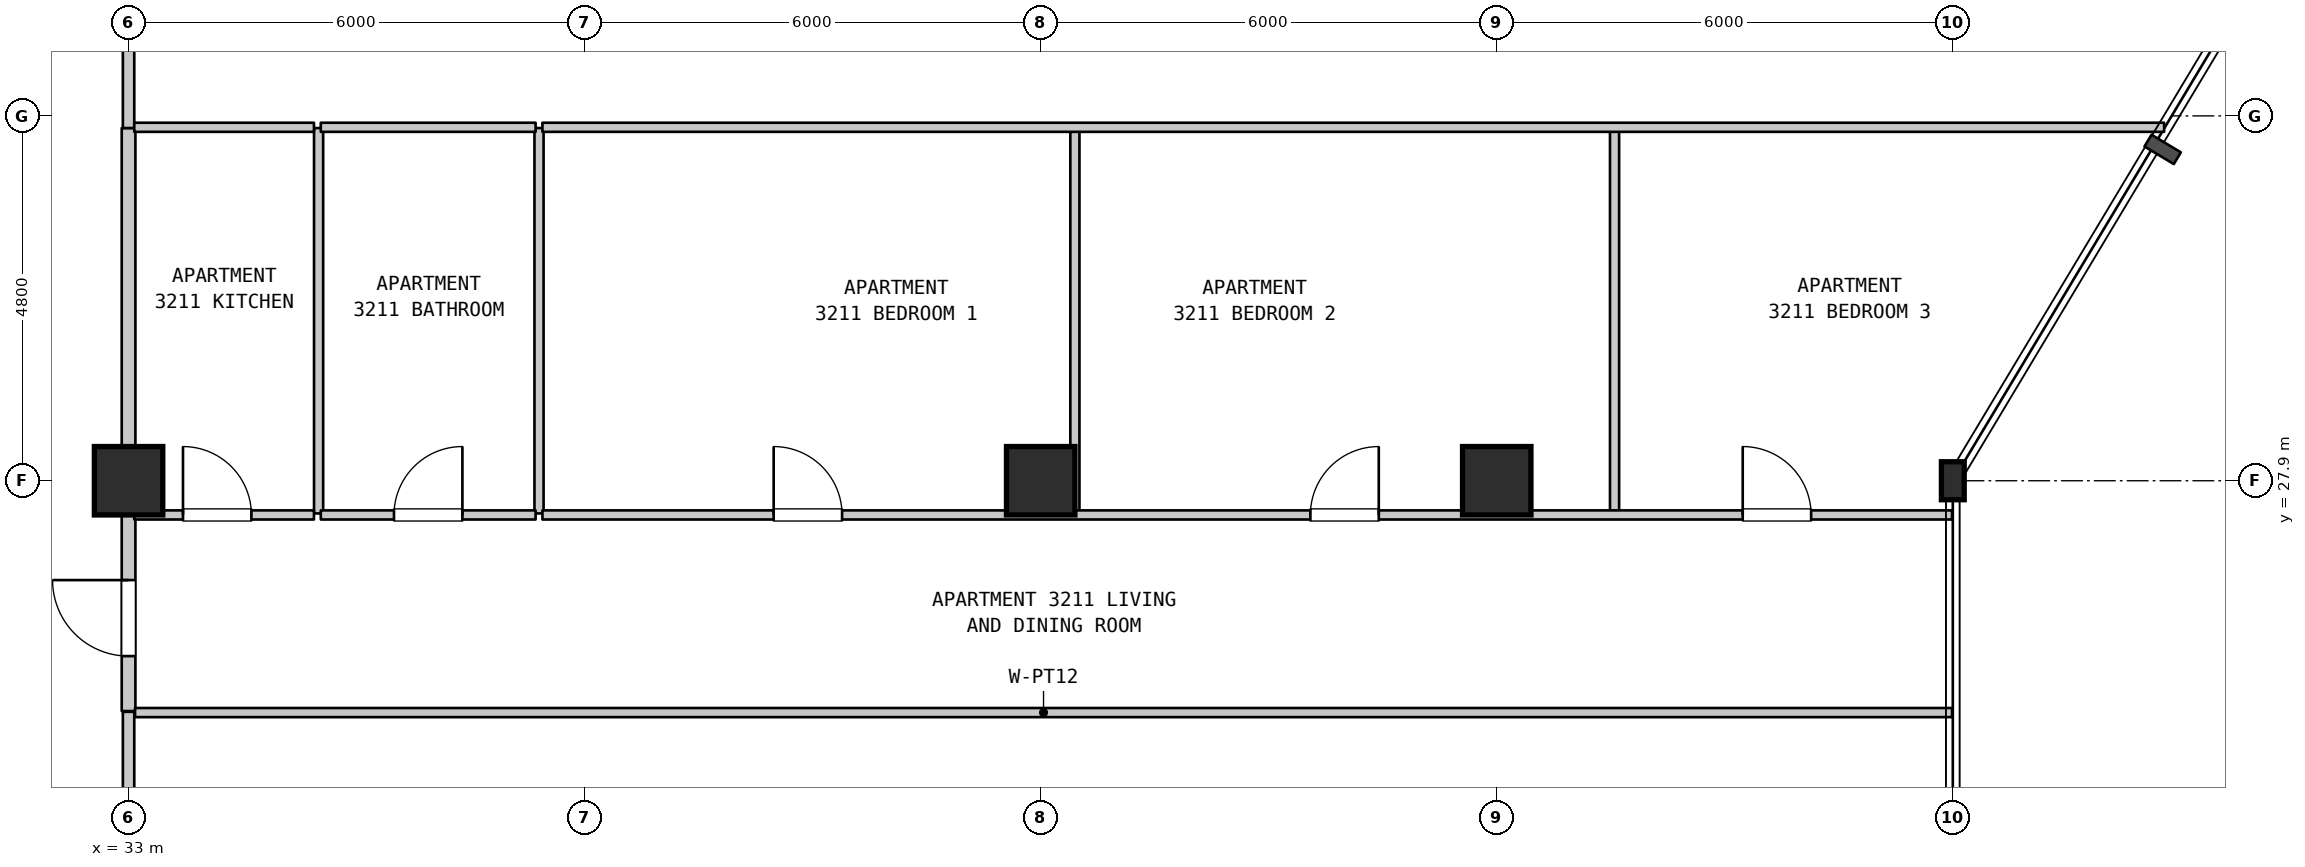
"""IFC4 building model, lengths in metres.
Left out: names, types, materials, properties, quantities, classifications, styles, units other than length and angle.
Written with IfcOpenShell. Run it as: python <this file> out.ifc"""

import sys

from ifc_helpers import new_model, si_unit, direction, frame, frame_2d, origin, origin_2d, place, context, subcontext, project, spatial, rectangle, i_section, extrude, element, fill, save


model = new_model("IFC4")
c1 = context("Model", 3, precision=1e-05, world=origin(), true_north=direction((0.0, 1.0)))
c2 = subcontext(c1, "Body", "Model", "MODEL_VIEW")
j1 = project(units=[si_unit("LENGTHUNIT", "METRE"), si_unit("PLANEANGLEUNIT", "RADIAN")], contexts=[c1])
p1 = place(None, origin())
s1 = spatial("IfcSite", under=j1, at=p1, CompositionType="ELEMENT")
p2 = place(p1, origin())
s2 = spatial("IfcBuilding", under=s1, at=p2, CompositionType="ELEMENT")
p3 = place(p2, frame((0.0, 0.0, 133.5)))
s3 = spatial("IfcBuildingStorey", under=s2, at=p3, CompositionType="ELEMENT", Elevation=133.5)
for number, where, z_axis, x_axis in (
    (1, (33.0, 27.9, 0.0), (0.0, 0.0, 1.0), (1.0, 0.0, 0.0)),
    (2, (45.0, 27.9, 0.0), (0.0, 0.0, 1.0), (1.0, 0.0, 0.0)),
    (3, (51.0, 27.9, 0.0), (0.0, 0.0, 1.0), (1.0, 0.0, 0.0)),
):
    element("IfcColumn", number, at=place(p3, frame(where, z_axis=z_axis, x_axis=x_axis)), inside=s3, PredefinedType="COLUMN", context=c2, shape_type="SweptSolid", body=[
        extrude(rectangle(XDim=0.9, YDim=0.9, at=origin_2d()), origin(), (0.0, 0.0, 1.0), 3.7),
    ])
p4 = place(p3, frame((57.0, 27.9, 0.0), z_axis=(0.0, 0.0, 1.0), x_axis=(1.0, 0.0, 0.0)))
e4 = element("IfcColumn", 4, at=p4, inside=s3, PredefinedType="COLUMN", context=c2, shape_type="SweptSolid", body=[
    extrude(i_section(OverallWidth=0.3, OverallDepth=0.5, WebThickness=0.014, FlangeThickness=0.028, FilletRadius=0.027, at=origin_2d()), origin(), (0.0, 0.0, 1.0), 3.7),
])
p5 = place(p3, frame((33.0, 19.51, 0.0), z_axis=(0.0, 0.0, 1.0), x_axis=(0.0, 1.0, 0.0)))
e5 = element("IfcWall", 5, at=p5, inside=s3, PredefinedType="STANDARD", context=c2, shape_type="SweptSolid", body=[
    extrude(rectangle(XDim=5.35, YDim=0.15, at=frame_2d((2.675, 0.0))), origin(), (0.0, 0.0, 1.0), 2.935),
])
p6 = place(p5, frame((1.534, 0.0, 0.0)))
e6 = element("IfcOpeningElement", 6, at=p6, cuts=e5, PredefinedType="OPENING", context=c2, shape_type="SweptSolid", body=[
    extrude(rectangle(XDim=1.0, YDim=2.15, at=frame_2d((0.5, 1.075))), frame((0.0, 0.085, 0.0), z_axis=(0.0, -1.0, 0.0), x_axis=(1.0, 0.0, 0.0)), (0.0, 0.0, 1.0), 0.17),
])
p7 = place(p3, frame((33.0, 24.87, 0.0), z_axis=(0.0, 0.0, 1.0), x_axis=(0.0, 1.0, 0.0)))
e7 = element("IfcWall", 7, at=p7, inside=s3, PredefinedType="STANDARD", context=c2, shape_type="SweptSolid", body=[
    extrude(rectangle(XDim=2.6, YDim=0.18, at=frame_2d((1.3, 0.0))), origin(), (0.0, 0.0, 1.0), 2.935),
])
p8 = place(p7, frame((0.723, 0.0, 0.0)))
e8 = element("IfcOpeningElement", 8, at=p8, cuts=e7, PredefinedType="OPENING", context=c2, shape_type="SweptSolid", body=[
    extrude(rectangle(XDim=1.0, YDim=2.15, at=frame_2d((0.5, 1.075))), frame((0.0, 0.1, 0.0), z_axis=(0.0, -1.0, 0.0), x_axis=(1.0, 0.0, 0.0)), (0.0, 0.0, 1.0), 0.2),
])
p9 = place(p3, frame((33.0, 27.47, 0.0), z_axis=(0.0, 0.0, 1.0), x_axis=(0.0, 1.0, 0.0)))
e9 = element("IfcWall", 9, at=p9, inside=s3, PredefinedType="STANDARD", context=c2, shape_type="SweptSolid", body=[
    extrude(rectangle(XDim=5.07, YDim=0.18, at=frame_2d((2.535, 0.0))), origin(), (0.0, 0.0, 1.0), 2.885),
])
p10 = place(p3, frame((33.0, 32.54, 0.0), z_axis=(0.0, 0.0, 1.0), x_axis=(0.0, 1.0, 0.0)))
e10 = element("IfcWall", 10, at=p10, inside=s3, PredefinedType="STANDARD", context=c2, shape_type="SweptSolid", body=[
    extrude(rectangle(XDim=5.36, YDim=0.15, at=frame_2d((2.68, 0.0))), origin(), (0.0, 0.0, 1.0), 2.885),
])
p11 = place(p10, frame((2.109, 0.0, 0.0)))
e11 = element("IfcOpeningElement", 11, at=p11, cuts=e10, PredefinedType="OPENING", context=c2, shape_type="SweptSolid", body=[
    extrude(rectangle(XDim=1.0, YDim=2.15, at=frame_2d((0.5, 1.075))), frame((0.0, 0.085, 0.0), z_axis=(0.0, -1.0, 0.0), x_axis=(1.0, 0.0, 0.0)), (0.0, 0.0, 1.0), 0.17),
])
for number, where, z_axis, x_axis in (
    (12, (35.5, 27.47, 0.0), (0.0, 0.0, 1.0), (0.0, 1.0, 0.0)),
    (13, (38.4, 27.47, 0.0), (0.0, 0.0, 1.0), (0.0, 1.0, 0.0)),
    (14, (45.45, 27.47, 0.0), (0.0, 0.0, 1.0), (0.0, 1.0, 0.0)),
    (15, (52.55, 27.47, 0.0), (0.0, 0.0, 1.0), (0.0, 1.0, 0.0)),
):
    element("IfcWall", number, at=place(p3, frame(where, z_axis=z_axis, x_axis=x_axis)), inside=s3, PredefinedType="PARTITIONING", context=c2, shape_type="SweptSolid", body=[
        extrude(rectangle(XDim=5.07, YDim=0.12, at=frame_2d((2.535, 0.0))), origin(), (0.0, 0.0, 1.0), 3.385),
    ])
p12 = place(p3, frame((33.085, 24.85, 0.0), z_axis=(0.0, 0.0, 1.0), x_axis=(1.0, 0.0, 0.0)))
e16 = element("IfcWall", 16, at=p12, inside=s3, PredefinedType="PARTITIONING", context=c2, shape_type="SweptSolid", body=[
    extrude(rectangle(XDim=23.905, YDim=0.12, at=frame_2d((11.953, 0.0))), origin(), (0.0, 0.0, 1.0), 3.385),
])
p13 = place(p3, frame((33.075, 27.45, 0.0), z_axis=(0.0, 0.0, 1.0), x_axis=(1.0, 0.0, 0.0)))
e17 = element("IfcWall", 17, at=p13, inside=s3, PredefinedType="PARTITIONING", context=c2, shape_type="SweptSolid", body=[
    extrude(rectangle(XDim=2.364, YDim=0.12, at=frame_2d((1.182, 0.0))), origin(), (0.0, 0.0, 1.0), 3.385),
])
p14 = place(p13, frame((0.641, 0.0, 0.0)))
e18 = element("IfcOpeningElement", 18, at=p14, cuts=e17, PredefinedType="OPENING", context=c2, shape_type="SweptSolid", body=[
    extrude(rectangle(XDim=0.9, YDim=2.15, at=frame_2d((0.45, 1.075))), frame((0.0, 0.07, 0.0), z_axis=(0.0, -1.0, 0.0), x_axis=(1.0, 0.0, 0.0)), (0.0, 0.0, 1.0), 0.14),
])
p15 = place(p3, frame((35.529, 27.45, 0.0), z_axis=(0.0, 0.0, 1.0), x_axis=(1.0, 0.0, 0.0)))
e19 = element("IfcWall", 19, at=p15, inside=s3, PredefinedType="PARTITIONING", context=c2, shape_type="SweptSolid", body=[
    extrude(rectangle(XDim=2.826, YDim=0.12, at=frame_2d((1.413, 0.0))), origin(), (0.0, 0.0, 1.0), 3.385),
])
p16 = place(p15, frame((0.963, 0.0, 0.0)))
e20 = element("IfcOpeningElement", 20, at=p16, cuts=e19, PredefinedType="OPENING", context=c2, shape_type="SweptSolid", body=[
    extrude(rectangle(XDim=0.9, YDim=2.1, at=frame_2d((0.45, 1.05))), frame((0.0, 0.07, 0.0), z_axis=(0.0, -1.0, 0.0), x_axis=(1.0, 0.0, 0.0)), (0.0, 0.0, 1.0), 0.14),
])
p17 = place(p3, frame((38.445, 27.45, 0.0), z_axis=(0.0, 0.0, 1.0), x_axis=(1.0, 0.0, 0.0)))
e21 = element("IfcWall", 21, at=p17, inside=s3, PredefinedType="PARTITIONING", context=c2, shape_type="SweptSolid", body=[
    extrude(rectangle(XDim=18.545, YDim=0.12, at=frame_2d((9.272, 0.0))), origin(), (0.0, 0.0, 1.0), 3.385),
])
p18 = place(p17, frame((3.042, 0.0, 0.0)))
e22 = element("IfcOpeningElement", 22, at=p18, cuts=e21, PredefinedType="OPENING", context=c2, shape_type="SweptSolid", body=[
    extrude(rectangle(XDim=0.9, YDim=2.15, at=frame_2d((0.45, 1.075))), frame((0.0, 0.07, 0.0), z_axis=(0.0, -1.0, 0.0), x_axis=(1.0, 0.0, 0.0)), (0.0, 0.0, 1.0), 0.14),
])
p19 = place(p17, frame((10.103, 0.0, 0.0)))
e23 = element("IfcOpeningElement", 23, at=p19, cuts=e21, PredefinedType="OPENING", context=c2, shape_type="SweptSolid", body=[
    extrude(rectangle(XDim=0.9, YDim=2.15, at=frame_2d((0.45, 1.075))), frame((0.0, 0.07, 0.0), z_axis=(0.0, -1.0, 0.0), x_axis=(1.0, 0.0, 0.0)), (0.0, 0.0, 1.0), 0.14),
])
p20 = place(p17, frame((15.791, 0.0, 0.0)))
e24 = element("IfcOpeningElement", 24, at=p20, cuts=e21, PredefinedType="OPENING", context=c2, shape_type="SweptSolid", body=[
    extrude(rectangle(XDim=0.9, YDim=2.15, at=frame_2d((0.45, 1.075))), frame((0.0, 0.07, 0.0), z_axis=(0.0, -1.0, 0.0), x_axis=(1.0, 0.0, 0.0)), (0.0, 0.0, 1.0), 0.14),
])
p21 = place(p3, frame((33.075, 32.55, 0.0), z_axis=(0.0, 0.0, 1.0), x_axis=(1.0, 0.0, 0.0)))
e25 = element("IfcWall", 25, at=p21, inside=s3, PredefinedType="PARTITIONING", context=c2, shape_type="SweptSolid", body=[
    extrude(rectangle(XDim=2.364, YDim=0.12, at=frame_2d((1.182, 0.0))), origin(), (0.0, 0.0, 1.0), 3.385),
])
p22 = place(p3, frame((35.529, 32.55, 0.0), z_axis=(0.0, 0.0, 1.0), x_axis=(1.0, 0.0, 0.0)))
e26 = element("IfcWall", 26, at=p22, inside=s3, PredefinedType="PARTITIONING", context=c2, shape_type="SweptSolid", body=[
    extrude(rectangle(XDim=2.826, YDim=0.12, at=frame_2d((1.413, 0.0))), origin(), (0.0, 0.0, 1.0), 3.385),
])
p23 = place(p3, frame((38.445, 32.55, 0.0), z_axis=(0.0, 0.0, 1.0), x_axis=(1.0, 0.0, 0.0)))
e27 = element("IfcWall", 27, at=p23, inside=s3, PredefinedType="PARTITIONING", context=c2, shape_type="SweptSolid", body=[
    extrude(rectangle(XDim=21.335, YDim=0.12, at=frame_2d((10.667, 0.0))), origin(), (0.0, 0.0, 1.0), 3.385),
])
p24 = place(p8, origin())
e28 = element("IfcDoor", 28, at=p24, inside=s3, OperationType="SINGLE_SWING_RIGHT", PredefinedType="DOOR", context=c2, shape_type="SweptSolid", body=[
    extrude(rectangle(XDim=1.0, YDim=2.15, at=frame_2d((0.5, 1.075))), frame((0.0, 0.025, 0.0), z_axis=(0.0, -1.0, 0.0), x_axis=(1.0, 0.0, 0.0)), (0.0, 0.0, 1.0), 0.05),
])
fill(e8, e28)
p25 = place(p14, origin())
e29 = element("IfcDoor", 29, at=p25, inside=s3, OperationType="SINGLE_SWING_LEFT", PredefinedType="DOOR", context=c2, shape_type="SweptSolid", body=[
    extrude(rectangle(XDim=0.9, YDim=2.15, at=frame_2d((0.45, 1.075))), frame((0.0, 0.025, 0.0), z_axis=(0.0, -1.0, 0.0), x_axis=(1.0, 0.0, 0.0)), (0.0, 0.0, 1.0), 0.05),
])
fill(e18, e29)
p26 = place(p16, origin())
e30 = element("IfcDoor", 30, at=p26, inside=s3, OperationType="SINGLE_SWING_RIGHT", PredefinedType="DOOR", context=c2, shape_type="SweptSolid", body=[
    extrude(rectangle(XDim=0.9, YDim=2.1, at=frame_2d((0.45, 1.05))), frame((0.0, 0.025, 0.0), z_axis=(0.0, -1.0, 0.0), x_axis=(1.0, 0.0, 0.0)), (0.0, 0.0, 1.0), 0.05),
])
fill(e20, e30)
p27 = place(p18, origin())
e31 = element("IfcDoor", 31, at=p27, inside=s3, OperationType="SINGLE_SWING_LEFT", PredefinedType="DOOR", context=c2, shape_type="SweptSolid", body=[
    extrude(rectangle(XDim=0.9, YDim=2.15, at=frame_2d((0.45, 1.075))), frame((0.0, 0.025, 0.0), z_axis=(0.0, -1.0, 0.0), x_axis=(1.0, 0.0, 0.0)), (0.0, 0.0, 1.0), 0.05),
])
fill(e22, e31)
p28 = place(p19, origin())
e32 = element("IfcDoor", 32, at=p28, inside=s3, OperationType="SINGLE_SWING_RIGHT", PredefinedType="DOOR", context=c2, shape_type="SweptSolid", body=[
    extrude(rectangle(XDim=0.9, YDim=2.15, at=frame_2d((0.45, 1.075))), frame((0.0, 0.025, 0.0), z_axis=(0.0, -1.0, 0.0), x_axis=(1.0, 0.0, 0.0)), (0.0, 0.0, 1.0), 0.05),
])
fill(e23, e32)
p29 = place(p20, origin())
e33 = element("IfcDoor", 33, at=p29, inside=s3, OperationType="SINGLE_SWING_LEFT", PredefinedType="DOOR", context=c2, shape_type="SweptSolid", body=[
    extrude(rectangle(XDim=0.9, YDim=2.15, at=frame_2d((0.45, 1.075))), frame((0.0, 0.025, 0.0), z_axis=(0.0, -1.0, 0.0), x_axis=(1.0, 0.0, 0.0)), (0.0, 0.0, 1.0), 0.05),
])
fill(e24, e33)
save(model, sys.argv[1])
